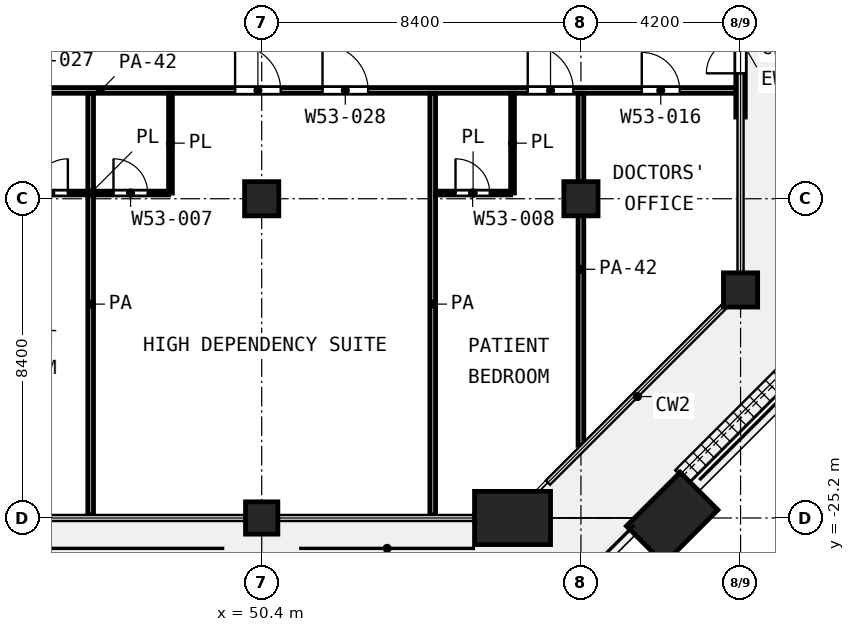
"""IFC4 building model, lengths in metres.
Left out: names, types, materials, properties, quantities, classifications, styles, units other than length and angle.
Written with IfcOpenShell. Run it as: python <this file> out.ifc"""

import sys

from ifc_helpers import new_model, si_unit, direction, frame, frame_2d, origin, origin_2d, place, context, subcontext, project, spatial, rectangle, extrude, element, fill, save


model = new_model("IFC4")
c1 = context("Model", 3, precision=1e-05, world=origin(), true_north=direction((0.0, 1.0)))
c2 = subcontext(c1, "Body", "Model", "MODEL_VIEW")
j1 = project(units=[si_unit("LENGTHUNIT", "METRE"), si_unit("PLANEANGLEUNIT", "RADIAN")], contexts=[c1])
p1 = place(None, origin())
s1 = spatial("IfcSite", under=j1, at=p1, CompositionType="ELEMENT")
p2 = place(p1, origin())
s2 = spatial("IfcBuilding", under=s1, at=p2, CompositionType="ELEMENT")
p3 = place(p2, frame((0.0, 0.0, 230.6)))
s3 = spatial("IfcBuildingStorey", under=s2, at=p3, CompositionType="ELEMENT", Elevation=230.6)
for number, where, z_axis, x_axis in (
    (1, (50.4, -16.8, 0.0), (0.0, 0.0, 1.0), (1.0, 0.0, 0.0)),
    (2, (58.8, -16.8, 0.0), (0.0, 0.0, 1.0), (1.0, 0.0, 0.0)),
    (3, (63.0, -19.2, 0.0), (0.0, 0.0, 1.0), (1.0, 0.0, 0.0)),
):
    element("IfcColumn", number, at=place(p3, frame(where, z_axis=z_axis, x_axis=x_axis)), inside=s3, PredefinedType="COLUMN", context=c2, shape_type="SweptSolid", body=[
        extrude(rectangle(XDim=0.9, YDim=0.9, at=origin_2d()), origin(), (0.0, 0.0, 1.0), 4.2),
    ])
p4 = place(p3, frame((50.4, -25.2, 0.0), z_axis=(0.0, 0.0, 1.0), x_axis=(1.0, 0.0, 0.0)))
e4 = element("IfcColumn", 4, at=p4, inside=s3, PredefinedType="COLUMN", context=c2, shape_type="SweptSolid", body=[
    extrude(rectangle(XDim=0.85, YDim=0.85, at=origin_2d()), origin(), (0.0, 0.0, 1.0), 4.2),
])
for number, where, z_axis, x_axis in (
    (5, (57.0, -25.2, 0.0), (0.0, 0.0, 1.0), (-1.0, 0.0, 0.0)),
    (6, (61.2, -25.2, 0.0), (0.0, 0.0, 1.0), (-0.707, -0.707, 0.0)),
):
    element("IfcColumn", number, at=place(p3, frame(where, z_axis=z_axis, x_axis=x_axis)), inside=s3, PredefinedType="COLUMN", context=c2, shape_type="SweptSolid", body=[
        extrude(rectangle(XDim=2.0, YDim=1.4, at=origin_2d()), origin(), (0.0, 0.0, 1.0), 4.2),
    ])
p5 = place(p3, frame((63.0, -14.65, 0.0), z_axis=(0.0, 0.0, 1.0), x_axis=(0.0, 1.0, 0.0)))
e7 = element("IfcWall", 7, at=p5, inside=s3, PredefinedType="SOLIDWALL", context=c2, shape_type="SweptSolid", body=[
    extrude(rectangle(XDim=4.1, YDim=0.25, at=frame_2d((2.05, 0.0))), origin(), (0.0, 0.0, 1.0), 2.58),
])
p6 = place(p5, frame((1.15, 0.0, 0.0)))
e8 = element("IfcOpeningElement", 8, at=p6, cuts=e7, PredefinedType="OPENING", context=c2, shape_type="SweptSolid", body=[
    extrude(rectangle(XDim=1.8, YDim=2.1, at=frame_2d((0.9, 1.05))), frame((0.0, 0.135, 0.0), z_axis=(0.0, -1.0, 0.0), x_axis=(1.0, 0.0, 0.0)), (0.0, 0.0, 1.0), 0.27),
])
p7 = place(p3, frame((43.85, -16.65, 0.0), z_axis=(0.0, 0.0, 1.0), x_axis=(1.0, 0.0, 0.0)))
e9 = element("IfcWall", 9, at=p7, inside=s3, PredefinedType="PARTITIONING", context=c2, shape_type="SweptSolid", body=[
    extrude(rectangle(XDim=4.1, YDim=0.1, at=frame_2d((2.05, 0.0))), origin(), (0.0, 0.0, 1.0), 3.6),
])
p8 = place(p7, frame((0.55, 0.0, 0.0)))
e10 = element("IfcOpeningElement", 10, at=p8, cuts=e9, PredefinedType="OPENING", context=c2, shape_type="SweptSolid", body=[
    extrude(rectangle(XDim=0.9, YDim=2.1, at=frame_2d((0.45, 1.05))), frame((0.0, 0.06, 0.0), z_axis=(0.0, -1.0, 0.0), x_axis=(1.0, 0.0, 0.0)), (0.0, 0.0, 1.0), 0.12),
])
p9 = place(p7, frame((2.65, 0.0, 0.0)))
e11 = element("IfcOpeningElement", 11, at=p9, cuts=e9, PredefinedType="OPENING", context=c2, shape_type="SweptSolid", body=[
    extrude(rectangle(XDim=0.9, YDim=2.1, at=frame_2d((0.45, 1.05))), frame((0.0, 0.06, 0.0), z_axis=(0.0, -1.0, 0.0), x_axis=(1.0, 0.0, 0.0)), (0.0, 0.0, 1.0), 0.12),
])
p10 = place(p3, frame((54.975, -16.65, 0.0), z_axis=(0.0, 0.0, 1.0), x_axis=(1.0, 0.0, 0.0)))
e12 = element("IfcWall", 12, at=p10, inside=s3, PredefinedType="PARTITIONING", context=c2, shape_type="SweptSolid", body=[
    extrude(rectangle(XDim=1.975, YDim=0.1, at=frame_2d((0.987, 0.0))), origin(), (0.0, 0.0, 1.0), 3.6),
])
p11 = place(p10, frame((0.525, 0.0, 0.0)))
e13 = element("IfcOpeningElement", 13, at=p11, cuts=e12, PredefinedType="OPENING", context=c2, shape_type="SweptSolid", body=[
    extrude(rectangle(XDim=0.9, YDim=2.1, at=frame_2d((0.45, 1.05))), frame((0.0, 0.06, 0.0), z_axis=(0.0, -1.0, 0.0), x_axis=(1.0, 0.0, 0.0)), (0.0, 0.0, 1.0), 0.12),
])
for number, where, z_axis, x_axis in (
    (14, (48.0, -16.65, 0.0), (0.0, 0.0, 1.0), (0.0, 1.0, 0.0)),
    (15, (57.0, -16.65, 0.0), (0.0, 0.0, 1.0), (0.0, 1.0, 0.0)),
):
    element("IfcWall", number, at=place(p3, frame(where, z_axis=z_axis, x_axis=x_axis)), inside=s3, PredefinedType="PARTITIONING", context=c2, shape_type="SweptSolid", body=[
        extrude(rectangle(XDim=2.625, YDim=0.1, at=frame_2d((1.312, 0.0))), origin(), (0.0, 0.0, 1.0), 3.6),
    ])
p12 = place(p3, frame((29.4, -13.95, 0.0), z_axis=(0.0, 0.0, 1.0), x_axis=(1.0, 0.0, 0.0)))
e16 = element("IfcWall", 16, at=p12, inside=s3, PredefinedType="PARTITIONING", context=c2, shape_type="SweptSolid", body=[
    extrude(rectangle(XDim=33.52, YDim=0.15, at=frame_2d((16.76, 0.0))), origin(), (0.0, 0.0, 1.0), 2.7),
])
p13 = place(p12, frame((1.5, 0.0, 0.0)))
e17 = element("IfcOpeningElement", 17, at=p13, cuts=e16, PredefinedType="OPENING", context=c2, shape_type="SweptSolid", body=[
    extrude(rectangle(XDim=1.2, YDim=2.1, at=frame_2d((0.6, 1.05))), frame((0.0, 0.085, 0.0), z_axis=(0.0, -1.0, 0.0), x_axis=(1.0, 0.0, 0.0)), (0.0, 0.0, 1.0), 0.17),
])
p14 = place(p12, frame((6.1, 0.0, 0.0)))
e18 = element("IfcOpeningElement", 18, at=p14, cuts=e16, PredefinedType="OPENING", context=c2, shape_type="SweptSolid", body=[
    extrude(rectangle(XDim=1.0, YDim=2.1, at=frame_2d((0.5, 1.05))), frame((0.0, 0.085, 0.0), z_axis=(0.0, -1.0, 0.0), x_axis=(1.0, 0.0, 0.0)), (0.0, 0.0, 1.0), 0.17),
])
p15 = place(p12, frame((11.3, 0.0, 0.0)))
e19 = element("IfcOpeningElement", 19, at=p15, cuts=e16, PredefinedType="OPENING", context=c2, shape_type="SweptSolid", body=[
    extrude(rectangle(XDim=1.1, YDim=2.1, at=frame_2d((0.55, 1.05))), frame((0.0, 0.085, 0.0), z_axis=(0.0, -1.0, 0.0), x_axis=(1.0, 0.0, 0.0)), (0.0, 0.0, 1.0), 0.17),
])
p16 = place(p12, frame((13.0, 0.0, 0.0)))
e20 = element("IfcOpeningElement", 20, at=p16, cuts=e16, PredefinedType="OPENING", context=c2, shape_type="SweptSolid", body=[
    extrude(rectangle(XDim=1.2, YDim=2.1, at=frame_2d((0.6, 1.05))), frame((0.0, 0.085, 0.0), z_axis=(0.0, -1.0, 0.0), x_axis=(1.0, 0.0, 0.0)), (0.0, 0.0, 1.0), 0.17),
])
p17 = place(p12, frame((22.6, 0.0, 0.0)))
e21 = element("IfcOpeningElement", 21, at=p17, cuts=e16, PredefinedType="OPENING", context=c2, shape_type="SweptSolid", body=[
    extrude(rectangle(XDim=1.2, YDim=2.1, at=frame_2d((0.6, 1.05))), frame((0.0, 0.085, 0.0), z_axis=(0.0, -1.0, 0.0), x_axis=(1.0, 0.0, 0.0)), (0.0, 0.0, 1.0), 0.17),
])
p18 = place(p12, frame((20.3, 0.0, 0.0)))
e22 = element("IfcOpeningElement", 22, at=p18, cuts=e16, PredefinedType="OPENING", context=c2, shape_type="SweptSolid", body=[
    extrude(rectangle(XDim=1.2, YDim=2.1, at=frame_2d((0.6, 1.05))), frame((0.0, 0.085, 0.0), z_axis=(0.0, -1.0, 0.0), x_axis=(1.0, 0.0, 0.0)), (0.0, 0.0, 1.0), 0.17),
])
p19 = place(p12, frame((28.0, 0.0, 0.0)))
e23 = element("IfcOpeningElement", 23, at=p19, cuts=e16, PredefinedType="OPENING", context=c2, shape_type="SweptSolid", body=[
    extrude(rectangle(XDim=1.2, YDim=2.1, at=frame_2d((0.6, 1.05))), frame((0.0, 0.085, 0.0), z_axis=(0.0, -1.0, 0.0), x_axis=(1.0, 0.0, 0.0)), (0.0, 0.0, 1.0), 0.17),
])
p20 = place(p12, frame((31.0, 0.0, 0.0)))
e24 = element("IfcOpeningElement", 24, at=p20, cuts=e16, PredefinedType="OPENING", context=c2, shape_type="SweptSolid", body=[
    extrude(rectangle(XDim=1.0, YDim=2.1, at=frame_2d((0.5, 1.05))), frame((0.0, 0.085, 0.0), z_axis=(0.0, -1.0, 0.0), x_axis=(1.0, 0.0, 0.0)), (0.0, 0.0, 1.0), 0.17),
])
for number, where, z_axis, x_axis in (
    (25, (45.9, -25.12, 0.0), (0.0, 0.0, 1.0), (0.0, 1.0, 0.0)),
    (26, (54.9, -25.12, 0.0), (0.0, 0.0, 1.0), (0.0, 1.0, 0.0)),
):
    element("IfcWall", number, at=place(p3, frame(where, z_axis=z_axis, x_axis=x_axis)), inside=s3, PredefinedType="PARTITIONING", context=c2, shape_type="SweptSolid", body=[
        extrude(rectangle(XDim=11.095, YDim=0.15, at=frame_2d((5.548, 0.0))), origin(), (0.0, 0.0, 1.0), 3.6),
    ])
p21 = place(p3, frame((58.8, -23.287, 0.0), z_axis=(0.0, 0.0, 1.0), x_axis=(0.0, 1.0, 0.0)))
e27 = element("IfcWall", 27, at=p21, inside=s3, PredefinedType="PARTITIONING", context=c2, shape_type="SweptSolid", body=[
    extrude(rectangle(XDim=9.262, YDim=0.15, at=frame_2d((4.631, 0.0))), origin(), (0.0, 0.0, 1.0), 2.7),
])
p22 = place(p6, origin())
e28 = element("IfcDoor", 28, at=p22, inside=s3, OperationType="DOUBLE_DOOR_SINGLE_SWING", PredefinedType="DOOR", context=c2, shape_type="SweptSolid", body=[
    extrude(rectangle(XDim=1.8, YDim=2.1, at=frame_2d((0.9, 1.05))), frame((0.0, 0.025, 0.0), z_axis=(0.0, -1.0, 0.0), x_axis=(1.0, 0.0, 0.0)), (0.0, 0.0, 1.0), 0.05),
])
fill(e8, e28)
p23 = place(p8, origin())
e29 = element("IfcDoor", 29, at=p23, inside=s3, OperationType="SINGLE_SWING_RIGHT", PredefinedType="DOOR", context=c2, shape_type="SweptSolid", body=[
    extrude(rectangle(XDim=0.9, YDim=2.1, at=frame_2d((0.45, 1.05))), frame((0.0, 0.025, 0.0), z_axis=(0.0, -1.0, 0.0), x_axis=(1.0, 0.0, 0.0)), (0.0, 0.0, 1.0), 0.05),
])
fill(e10, e29)
p24 = place(p17, origin())
e30 = element("IfcDoor", 30, at=p24, inside=s3, OperationType="SINGLE_SWING_LEFT", PredefinedType="DOOR", context=c2, shape_type="SweptSolid", body=[
    extrude(rectangle(XDim=1.2, YDim=2.1, at=frame_2d((0.6, 1.05))), frame((0.0, 0.025, 0.0), z_axis=(0.0, -1.0, 0.0), x_axis=(1.0, 0.0, 0.0)), (0.0, 0.0, 1.0), 0.05),
])
fill(e21, e30)
p25 = place(p18, origin())
e31 = element("IfcDoor", 31, at=p25, inside=s3, OperationType="SINGLE_SWING_LEFT", PredefinedType="DOOR", context=c2, shape_type="SweptSolid", body=[
    extrude(rectangle(XDim=1.2, YDim=2.1, at=frame_2d((0.6, 1.05))), frame((0.0, 0.025, 0.0), z_axis=(0.0, -1.0, 0.0), x_axis=(1.0, 0.0, 0.0)), (0.0, 0.0, 1.0), 0.05),
])
fill(e22, e31)
p26 = place(p9, origin())
e32 = element("IfcDoor", 32, at=p26, inside=s3, OperationType="SINGLE_SWING_LEFT", PredefinedType="DOOR", context=c2, shape_type="SweptSolid", body=[
    extrude(rectangle(XDim=0.9, YDim=2.1, at=frame_2d((0.45, 1.05))), frame((0.0, 0.025, 0.0), z_axis=(0.0, -1.0, 0.0), x_axis=(1.0, 0.0, 0.0)), (0.0, 0.0, 1.0), 0.05),
])
fill(e11, e32)
p27 = place(p19, origin())
e33 = element("IfcDoor", 33, at=p27, inside=s3, OperationType="SINGLE_SWING_LEFT", PredefinedType="DOOR", context=c2, shape_type="SweptSolid", body=[
    extrude(rectangle(XDim=1.2, YDim=2.1, at=frame_2d((0.6, 1.05))), frame((0.0, 0.025, 0.0), z_axis=(0.0, -1.0, 0.0), x_axis=(1.0, 0.0, 0.0)), (0.0, 0.0, 1.0), 0.05),
])
fill(e23, e33)
p28 = place(p11, origin())
e34 = element("IfcDoor", 34, at=p28, inside=s3, OperationType="SINGLE_SWING_LEFT", PredefinedType="DOOR", context=c2, shape_type="SweptSolid", body=[
    extrude(rectangle(XDim=0.9, YDim=2.1, at=frame_2d((0.45, 1.05))), frame((0.0, 0.025, 0.0), z_axis=(0.0, -1.0, 0.0), x_axis=(1.0, 0.0, 0.0)), (0.0, 0.0, 1.0), 0.05),
])
fill(e13, e34)
p29 = place(p20, origin())
e35 = element("IfcDoor", 35, at=p29, inside=s3, OperationType="SINGLE_SWING_LEFT", PredefinedType="DOOR", context=c2, shape_type="SweptSolid", body=[
    extrude(rectangle(XDim=1.0, YDim=2.1, at=frame_2d((0.5, 1.05))), frame((0.0, 0.025, 0.0), z_axis=(0.0, -1.0, 0.0), x_axis=(1.0, 0.0, 0.0)), (0.0, 0.0, 1.0), 0.05),
])
fill(e24, e35)
save(model, sys.argv[1])
